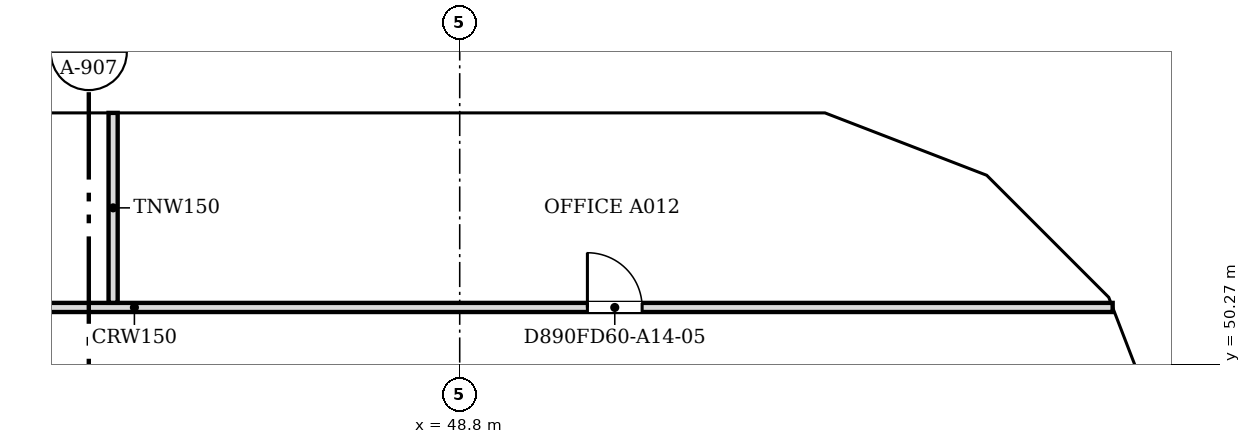
"""IFC4 building model, lengths in metres.
Left out: names, types, materials, properties, quantities, classifications, styles, units other than length and angle.
Written with IfcOpenShell. Run it as: python <this file> out.ifc"""

import sys

from ifc_helpers import new_model, si_unit, direction, frame, frame_2d, origin, place, context, subcontext, project, spatial, polyline, rectangle, outline, extrude, faceted_brep, source, transform, mapped, element, fill, save


model = new_model("IFC4")
c1 = context("Model", 3, precision=1e-05, world=origin(), true_north=direction((0.0, 1.0)))
c2 = subcontext(c1, "Body", "Model", "MODEL_VIEW")
j1 = project(units=[si_unit("LENGTHUNIT", "METRE"), si_unit("PLANEANGLEUNIT", "RADIAN")], contexts=[c1])
p1 = place(None, origin())
s1 = spatial("IfcSite", under=j1, at=p1, CompositionType="ELEMENT")
p2 = place(p1, origin())
s2 = spatial("IfcBuilding", under=s1, at=p2, CompositionType="ELEMENT")
p3 = place(p2, frame((0.0, 0.0, 155.4)))
s3 = spatial("IfcBuildingStorey", under=s2, at=p3, CompositionType="ELEMENT", Elevation=155.4)
m1 = source(origin(), c2, "Body", "Brep", [
    faceted_brep([(3.003, -0.25, 3.732), (2.95, -0.25, 3.8), (0.0, -0.25, 0.0), (3.003, -0.25, 0.0), (0.047, 0.25, 0.06), (2.898, 0.25, 3.732), (2.898, 0.25, 0.0), (0.047, 0.25, 0.0), (2.95, 0.0, 3.8), (0.0, 0.0, 0.0)], [[[0, 1, 2, 3]], [[4, 5, 6, 7]], [[8, 1, 0]], [[5, 4, 9, 2, 1, 8]], [[7, 6, 3, 2, 9]], [[7, 9, 4]], [[3, 6, 5, 8, 0]]]),
])
p4 = place(p3, frame((60.75, 48.753, 0.0), z_axis=(0.0, 0.0, 1.0), x_axis=(-0.35992665181, 0.932980602862, 0.0)))
e1 = element("IfcWall", 1, at=p4, inside=s3, PredefinedType="SOLIDWALL", context=c2, shape_type="MappedRepresentation", body=[
    mapped(m1, transform((0.0, 0.0, 0.0), scale=1.0)),
])
m2 = source(origin(), c2, "Body", "SweptSolid", [
    extrude(outline(polyline([(2.75, 3.135), (0.511, 0.25), (2.75, 0.25), (2.75, 3.135)])), frame((0.0, 0.26, 0.0), z_axis=(0.0, -1.0, 0.0), x_axis=(1.0, 0.0, 0.0)), (0.0, 0.0, 1.0), 0.52),
])
p5 = place(p4, origin())
e2 = element("IfcOpeningElement", 2, at=p5, cuts=e1, PredefinedType="OPENING", context=c2, shape_type="MappedRepresentation", body=[
    mapped(m2, transform((0.0, 0.0, 0.0), scale=1.0)),
])
m3 = source(origin(), c2, "Body", "Brep", [
    faceted_brep([(2.997, -0.25, 0.0), (0.053, -0.25, 3.8), (0.0, -0.25, 3.732), (0.0, -0.25, 0.0), (0.106, 0.25, 3.732), (2.944, 0.25, 0.068), (2.944, 0.25, 0.0), (0.106, 0.25, 0.0), (0.053, 0.0, 3.8), (2.997, 0.0, 0.0)], [[[0, 1, 2, 3]], [[4, 5, 6, 7]], [[5, 4, 8, 1, 0, 9]], [[2, 1, 8]], [[7, 6, 9, 0, 3]], [[7, 3, 2, 8, 4]], [[9, 6, 5]]]),
])
p6 = place(p3, frame((59.726, 51.469, 0.0), z_axis=(0.0, 0.0, 1.0), x_axis=(-0.707106781187, 0.707106781187, 0.0)))
e3 = element("IfcWall", 3, at=p6, inside=s3, PredefinedType="SOLIDWALL", context=c2, shape_type="MappedRepresentation", body=[
    mapped(m3, transform((0.0, 0.0, 0.0), scale=1.0)),
])
m4 = source(origin(), c2, "Body", "SweptSolid", [
    extrude(outline(polyline([(2.487, 0.25), (0.253, 3.134), (0.253, 0.25), (2.487, 0.25)])), frame((0.0, 0.26, 0.0), z_axis=(0.0, -1.0, 0.0), x_axis=(1.0, 0.0, 0.0)), (0.0, 0.0, 1.0), 0.52),
])
p7 = place(p6, origin())
e4 = element("IfcOpeningElement", 4, at=p7, cuts=e3, PredefinedType="OPENING", context=c2, shape_type="MappedRepresentation", body=[
    mapped(m4, transform((0.0, 0.0, 0.0), scale=1.0)),
])
m5 = source(origin(), c2, "Body", "Brep", [
    faceted_brep([(2.997, -0.25, 3.741), (2.95, -0.25, 3.8), (0.0, -0.25, 0.0), (2.997, -0.25, 0.0), (0.053, 0.25, 0.068), (2.904, 0.25, 3.74), (2.904, 0.25, 0.0), (0.053, 0.25, 0.0), (2.95, 0.0, 3.8), (0.0, 0.0, 0.0)], [[[0, 1, 2, 3]], [[4, 5, 6, 7]], [[8, 1, 0]], [[5, 4, 9, 2, 1, 8]], [[7, 6, 3, 2, 9]], [[7, 9, 4]], [[3, 6, 5, 8, 0]]]),
])
p8 = place(p3, frame((57.606, 53.588, 0.0), z_axis=(0.0, 0.0, 1.0), x_axis=(-0.932990326376, 0.359901446078, 0.0)))
e5 = element("IfcWall", 5, at=p8, inside=s3, PredefinedType="SOLIDWALL", context=c2, shape_type="MappedRepresentation", body=[
    mapped(m5, transform((0.0, 0.0, 0.0), scale=1.0)),
])
p9 = place(p8, origin())
e6 = element("IfcOpeningElement", 6, at=p9, cuts=e5, PredefinedType="OPENING", context=c2, shape_type="MappedRepresentation", body=[
    mapped(m2, transform((0.0, 0.0, 0.0), scale=1.0)),
])
m6 = source(origin(), c2, "Body", "Brep", [
    faceted_brep([(3.05, -0.25, 0.0), (0.047, -0.25, 3.8), (0.0, -0.25, 3.74), (0.0, -0.25, 0.0), (0.093, 0.25, 3.741), (3.05, 0.25, 0.0), (0.093, 0.25, 0.0), (0.047, 0.0, 3.8)], [[[0, 1, 2, 3]], [[4, 5, 6]], [[5, 4, 7, 1, 0]], [[2, 1, 7]], [[6, 5, 0, 3]], [[6, 3, 2, 7, 4]]]),
])
p10 = place(p3, frame((54.9, 54.65, 0.0), z_axis=(0.0, 0.0, 1.0), x_axis=(-1.0, 0.0, 0.0)))
e7 = element("IfcWall", 7, at=p10, inside=s3, PredefinedType="SOLIDWALL", context=c2, shape_type="MappedRepresentation", body=[
    mapped(m6, transform((0.0, 0.0, 0.0), scale=1.0)),
])
m7 = source(origin(), c2, "Body", "SweptSolid", [
    extrude(outline(polyline([(2.534, 0.25), (0.247, 3.144), (0.247, 0.25), (2.534, 0.25)])), frame((0.0, 0.26, 0.0), z_axis=(0.0, -1.0, 0.0), x_axis=(1.0, 0.0, 0.0)), (0.0, 0.0, 1.0), 0.52),
])
p11 = place(p10, origin())
e8 = element("IfcOpeningElement", 8, at=p11, cuts=e7, PredefinedType="OPENING", context=c2, shape_type="MappedRepresentation", body=[
    mapped(m7, transform((0.0, 0.0, 0.0), scale=1.0)),
])
m8 = source(origin(), c2, "Body", "SweptSolid", [
    extrude(outline(polyline([(6.1, 0.0), (3.05, 3.8), (0.0, 0.0), (6.1, 0.0)])), frame((0.0, 0.25, 0.0), z_axis=(0.0, -1.0, 0.0), x_axis=(1.0, 0.0, 0.0)), (0.0, 0.0, 1.0), 0.5),
])
p12 = place(p3, frame((51.85, 54.65, 0.0), z_axis=(0.0, 0.0, 1.0), x_axis=(-1.0, 0.0, 0.0)))
e9 = element("IfcWall", 9, at=p12, inside=s3, PredefinedType="SOLIDWALL", context=c2, shape_type="MappedRepresentation", body=[
    mapped(m8, transform((0.0, 0.0, 0.0), scale=1.0)),
])
m9 = source(origin(), c2, "Body", "SweptSolid", [
    extrude(outline(polyline([(5.579, 0.25), (3.05, 3.401), (0.521, 0.25), (5.579, 0.25)])), frame((0.0, 0.26, 0.0), z_axis=(0.0, -1.0, 0.0), x_axis=(1.0, 0.0, 0.0)), (0.0, 0.0, 1.0), 0.52),
])
p13 = place(p12, origin())
e10 = element("IfcOpeningElement", 10, at=p13, cuts=e9, PredefinedType="OPENING", context=c2, shape_type="MappedRepresentation", body=[
    mapped(m9, transform((0.0, 0.0, 0.0), scale=1.0)),
])
p14 = place(p3, frame((45.75, 54.65, 0.0), z_axis=(0.0, 0.0, 1.0), x_axis=(-1.0, 0.0, 0.0)))
e11 = element("IfcWall", 11, at=p14, inside=s3, PredefinedType="SOLIDWALL", context=c2, shape_type="MappedRepresentation", body=[
    mapped(m8, transform((0.0, 0.0, 0.0), scale=1.0)),
])
p15 = place(p14, origin())
e12 = element("IfcOpeningElement", 12, at=p15, cuts=e11, PredefinedType="OPENING", context=c2, shape_type="MappedRepresentation", body=[
    mapped(m9, transform((0.0, 0.0, 0.0), scale=1.0)),
])
p16 = place(p2, frame((0.0, 0.0, 159.2)))
s4 = spatial("IfcBuildingStorey", under=s2, at=p16, CompositionType="ELEMENT", Elevation=159.2)
m10 = source(origin(), c2, "Body", "Brep", [
    faceted_brep([(0.047, -0.25, 0.0), (2.997, -0.25, 3.8), (0.047, -0.25, 7.6), (0.0, -0.25, 7.541), (0.0, -0.25, 0.059), (0.093, 0.25, 7.54), (2.944, 0.25, 3.868), (2.944, 0.25, 3.732), (0.093, 0.25, 0.06), (2.997, 0.0, 3.8), (0.047, 0.0, 0.0), (0.047, 0.0, 7.6)], [[[0, 1, 2, 3, 4]], [[5, 6, 7, 8]], [[8, 7, 9, 1, 0, 10]], [[6, 5, 11, 2, 1, 9]], [[3, 2, 11]], [[10, 0, 4]], [[8, 10, 4, 3, 11, 5]], [[9, 7, 6]]]),
])
p17 = place(p16, frame((60.767, 48.71, -3.8), z_axis=(0.0, 0.0, 1.0), x_axis=(-0.359901446078, 0.932990326376, 0.0)))
e13 = element("IfcWall", 13, at=p17, inside=s4, PredefinedType="SOLIDWALL", context=c2, shape_type="MappedRepresentation", body=[
    mapped(m10, transform((0.0, 0.0, 0.0), scale=1.0)),
])
m11 = source(origin(), c2, "Body", "SweptSolid", [
    extrude(outline(polyline([(0.247, 0.665), (2.681, 3.8), (0.247, 6.935), (0.247, 0.665)])), frame((0.0, 0.26, 0.0), z_axis=(0.0, -1.0, 0.0), x_axis=(1.0, 0.0, 0.0)), (0.0, 0.0, 1.0), 0.52),
])
p18 = place(p17, origin())
e14 = element("IfcOpeningElement", 14, at=p18, cuts=e13, PredefinedType="OPENING", context=c2, shape_type="MappedRepresentation", body=[
    mapped(m11, transform((0.0, 0.0, 0.0), scale=1.0)),
])
m12 = source(origin(), c2, "Body", "Brep", [
    faceted_brep([(2.944, -0.25, 0.0), (2.997, -0.25, 0.068), (2.997, -0.25, 7.532), (2.944, -0.25, 7.6), (0.0, -0.25, 3.8), (0.053, 0.25, 3.868), (2.891, 0.25, 7.532), (2.891, 0.25, 0.068), (0.053, 0.25, 3.732), (2.944, 0.0, 0.0), (2.944, 0.0, 7.6), (0.0, 0.0, 3.8)], [[[0, 1, 2, 3, 4]], [[5, 6, 7, 8]], [[1, 0, 9]], [[10, 3, 2]], [[6, 5, 11, 4, 3, 10]], [[8, 7, 9, 0, 4, 11]], [[8, 11, 5]], [[1, 9, 7, 6, 10, 2]]]),
])
p19 = place(p16, frame((59.688, 51.506, -3.8), z_axis=(0.0, 0.0, 1.0), x_axis=(-0.707106781187, 0.707106781187, 0.0)))
e15 = element("IfcWall", 15, at=p19, inside=s4, PredefinedType="SOLIDWALL", context=c2, shape_type="MappedRepresentation", body=[
    mapped(m12, transform((0.0, 0.0, 0.0), scale=1.0)),
])
m13 = source(origin(), c2, "Body", "SweptSolid", [
    extrude(outline(polyline([(2.744, 6.934), (0.316, 3.8), (2.744, 0.667), (2.744, 6.934)])), frame((0.0, 0.26, 0.0), z_axis=(0.0, -1.0, 0.0), x_axis=(1.0, 0.0, 0.0)), (0.0, 0.0, 1.0), 0.52),
])
p20 = place(p19, origin())
e16 = element("IfcOpeningElement", 16, at=p20, cuts=e15, PredefinedType="OPENING", context=c2, shape_type="MappedRepresentation", body=[
    mapped(m13, transform((0.0, 0.0, 0.0), scale=1.0)),
])
m14 = source(origin(), c2, "Body", "Brep", [
    faceted_brep([(0.053, -0.25, 0.0), (3.003, -0.25, 3.8), (0.053, -0.25, 7.6), (0.0, -0.25, 7.532), (0.0, -0.25, 0.068), (0.106, 0.25, 7.532), (2.957, 0.25, 3.86), (2.957, 0.25, 3.74), (0.106, 0.25, 0.068), (3.003, 0.0, 3.8), (0.053, 0.0, 0.0), (0.053, 0.0, 7.6)], [[[0, 1, 2, 3, 4]], [[5, 6, 7, 8]], [[8, 7, 9, 1, 0, 10]], [[6, 5, 11, 2, 1, 9]], [[3, 2, 11]], [[10, 0, 4]], [[8, 10, 4, 3, 11, 5]], [[9, 7, 6]]]),
])
p21 = place(p16, frame((57.656, 53.569, -3.8), z_axis=(0.0, 0.0, 1.0), x_axis=(-0.933007896601, 0.359855894603, 0.0)))
e17 = element("IfcWall", 17, at=p21, inside=s4, PredefinedType="SOLIDWALL", context=c2, shape_type="MappedRepresentation", body=[
    mapped(m14, transform((0.0, 0.0, 0.0), scale=1.0)),
])
m15 = source(origin(), c2, "Body", "SweptSolid", [
    extrude(outline(polyline([(0.253, 0.665), (2.687, 3.8), (0.253, 6.935), (0.253, 0.665)])), frame((0.0, 0.26, 0.0), z_axis=(0.0, -1.0, 0.0), x_axis=(1.0, 0.0, 0.0)), (0.0, 0.0, 1.0), 0.52),
])
p22 = place(p21, origin())
e18 = element("IfcOpeningElement", 18, at=p22, cuts=e17, PredefinedType="OPENING", context=c2, shape_type="MappedRepresentation", body=[
    mapped(m15, transform((0.0, 0.0, 0.0), scale=1.0)),
])
m16 = source(origin(), c2, "Body", "Brep", [
    faceted_brep([(3.003, -0.25, 0.0), (6.053, -0.25, 3.8), (3.003, -0.25, 7.6), (0.0, -0.25, 3.8), (0.047, 0.25, 3.859), (3.003, 0.25, 7.6), (6.053, 0.25, 3.8), (3.003, 0.25, 0.0), (0.047, 0.25, 3.741), (0.0, 0.0, 3.8)], [[[0, 1, 2, 3]], [[4, 5, 6, 7, 8]], [[7, 6, 1, 0]], [[6, 5, 2, 1]], [[5, 4, 9, 3, 2]], [[8, 7, 0, 3, 9]], [[8, 9, 4]]]),
])
p23 = place(p16, frame((54.854, 54.65, -3.8), z_axis=(0.0, 0.0, 1.0), x_axis=(-1.0, 0.0, 0.0)))
e19 = element("IfcWall", 19, at=p23, inside=s4, PredefinedType="SOLIDWALL", context=c2, shape_type="MappedRepresentation", body=[
    mapped(m16, transform((0.0, 0.0, 0.0), scale=1.0)),
])
m17 = source(origin(), c2, "Body", "SweptSolid", [
    extrude(outline(polyline([(3.005, 0.401), (5.733, 3.8), (3.005, 7.199), (0.319, 3.8), (3.005, 0.401)])), frame((0.0, 0.26, 0.0), z_axis=(0.0, -1.0, 0.0), x_axis=(1.0, 0.0, 0.0)), (0.0, 0.0, 1.0), 0.52),
])
p24 = place(p23, origin())
e20 = element("IfcOpeningElement", 20, at=p24, cuts=e19, PredefinedType="OPENING", context=c2, shape_type="MappedRepresentation", body=[
    mapped(m17, transform((0.0, 0.0, 0.0), scale=1.0)),
])
m18 = source(origin(), c2, "Body", "SweptSolid", [
    extrude(outline(polyline([(3.05, 0.0), (6.1, 3.8), (3.05, 7.6), (0.0, 3.8), (3.05, 0.0)])), frame((0.0, 0.25, 0.0), z_axis=(0.0, -1.0, 0.0), x_axis=(1.0, 0.0, 0.0)), (0.0, 0.0, 1.0), 0.5),
])
p25 = place(p16, frame((48.8, 54.65, -3.8), z_axis=(0.0, 0.0, 1.0), x_axis=(-1.0, 0.0, 0.0)))
e21 = element("IfcWall", 21, at=p25, inside=s4, PredefinedType="SOLIDWALL", context=c2, shape_type="MappedRepresentation", body=[
    mapped(m18, transform((0.0, 0.0, 0.0), scale=1.0)),
])
m19 = source(origin(), c2, "Body", "SweptSolid", [
    extrude(outline(polyline([(3.05, 0.399), (5.78, 3.8), (3.05, 7.201), (0.321, 3.8), (3.05, 0.399)])), frame((0.0, 0.26, 0.0), z_axis=(0.0, -1.0, 0.0), x_axis=(1.0, 0.0, 0.0)), (0.0, 0.0, 1.0), 0.52),
])
p26 = place(p25, origin())
e22 = element("IfcOpeningElement", 22, at=p26, cuts=e21, PredefinedType="OPENING", context=c2, shape_type="MappedRepresentation", body=[
    mapped(m19, transform((0.0, 0.0, 0.0), scale=1.0)),
])
m20 = source(origin(), c2, "Body", "Brep", [
    faceted_brep([(3.05, -0.25, 0.0), (6.1, -0.25, 3.8), (6.1, -0.25, 3.8), (3.05, -0.25, 7.6), (0.0, -0.25, 3.8), (0.0, 0.25, 3.8), (3.05, 0.25, 7.6), (6.1, 0.25, 3.8), (6.1, 0.25, 3.8), (3.05, 0.25, 0.0)], [[[0, 1, 2, 3, 4]], [[5, 6, 7, 8, 9]], [[9, 8, 1, 0]], [[7, 6, 3, 2]], [[6, 5, 4, 3]], [[5, 9, 0, 4]], [[1, 8, 7, 2]]]),
])
p27 = place(p16, frame((42.7, 54.65, -3.8), z_axis=(0.0, 0.0, 1.0), x_axis=(-1.0, 0.0, 0.0)))
e23 = element("IfcWall", 23, at=p27, inside=s4, PredefinedType="SOLIDWALL", context=c2, shape_type="MappedRepresentation", body=[
    mapped(m20, transform((0.0, 0.0, 0.0), scale=1.0)),
])
p28 = place(p27, origin())
e24 = element("IfcOpeningElement", 24, at=p28, cuts=e23, PredefinedType="OPENING", context=c2, shape_type="MappedRepresentation", body=[
    mapped(m19, transform((0.0, 0.0, 0.0), scale=1.0)),
])
p29 = place(p3, frame((28.1, 51.2, 0.0), z_axis=(0.0, 0.0, 1.0), x_axis=(1.0, 0.0, 0.0)))
e25 = element("IfcWall", 25, at=p29, inside=s3, PredefinedType="PARTITIONING", context=c2, shape_type="SweptSolid", body=[
    extrude(rectangle(XDim=31.438, YDim=0.15, at=frame_2d((15.719, 0.0))), origin(), (0.0, 0.0, 1.0), 3.067),
])
m21 = source(origin(), c2, "Body", "SweptSolid", [
    extrude(rectangle(XDim=0.9, YDim=2.1, at=frame_2d((0.45, 1.05))), frame((0.0, 0.085, 0.0), z_axis=(0.0, -1.0, 0.0), x_axis=(1.0, 0.0, 0.0)), (0.0, 0.0, 1.0), 0.17),
])
p30 = place(p29, frame((7.0, 0.0, 0.0)))
e26 = element("IfcOpeningElement", 26, at=p30, cuts=e25, PredefinedType="OPENING", context=c2, shape_type="MappedRepresentation", body=[
    mapped(m21, transform((0.0, 0.0, 0.0), scale=1.0)),
])
p31 = place(p29, frame((22.8, 0.0, 0.0)))
e27 = element("IfcOpeningElement", 27, at=p31, cuts=e25, PredefinedType="OPENING", context=c2, shape_type="MappedRepresentation", body=[
    mapped(m21, transform((0.0, 0.0, 0.0), scale=1.0)),
])
p32 = place(p3, frame((43.1, 51.276, 0.0), z_axis=(0.0, 0.0, 1.0), x_axis=(0.0, 1.0, 0.0)))
e28 = element("IfcWall", 28, at=p32, inside=s3, PredefinedType="PARTITIONING", context=c2, shape_type="SweptSolid", body=[
    extrude(rectangle(XDim=3.124, YDim=0.15, at=frame_2d((1.562, 0.0))), origin(), (0.0, 0.0, 1.0), 3.067),
])
m22 = source(origin(), c2, "Body", "SweptSolid", [
    extrude(rectangle(XDim=0.9, YDim=2.1, at=frame_2d((0.45, 1.05))), frame((0.0, 0.025, 0.0), z_axis=(0.0, -1.0, 0.0), x_axis=(1.0, 0.0, 0.0)), (0.0, 0.0, 1.0), 0.05),
])
p33 = place(p31, origin())
e29 = element("IfcDoor", 29, at=p33, inside=s3, OperationType="SINGLE_SWING_LEFT", PredefinedType="DOOR", context=c2, shape_type="MappedRepresentation", body=[
    mapped(m22, transform((0.0, 0.0, 0.0), scale=1.0)),
])
fill(e27, e29)
save(model, sys.argv[1])
